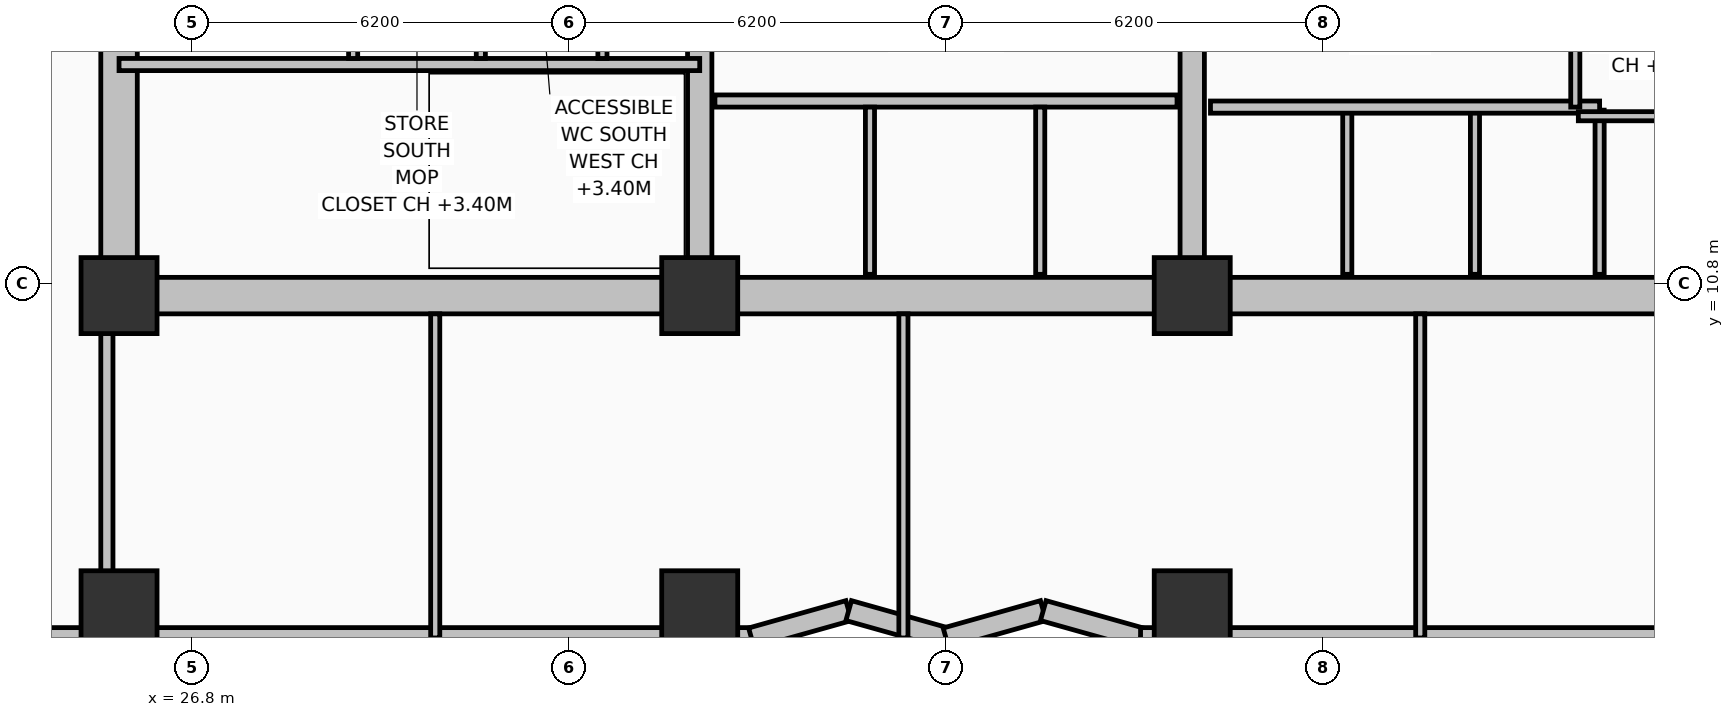
"""IFC4 building model, lengths in metres.
Left out: names, types, materials, properties, quantities, classifications, styles, units other than length and angle.
Written with IfcOpenShell. Run it as: python <this file> out.ifc"""

import sys

from ifc_helpers import new_model, si_unit, direction, frame, frame_2d, origin, origin_2d, place, context, subcontext, project, spatial, rectangle, extrude, element, fill, save


model = new_model("IFC4")
c1 = context("Model", 3, precision=1e-05, world=origin(), true_north=direction((0.0, 1.0)))
c2 = subcontext(c1, "Body", "Model", "MODEL_VIEW")
j1 = project(units=[si_unit("LENGTHUNIT", "METRE"), si_unit("PLANEANGLEUNIT", "RADIAN")], contexts=[c1])
p1 = place(None, origin())
s1 = spatial("IfcSite", under=j1, at=p1, CompositionType="ELEMENT")
p2 = place(p1, origin())
s2 = spatial("IfcBuilding", under=s1, at=p2, CompositionType="ELEMENT")
p3 = place(p2, frame((0.0, 0.0, 36.2)))
s3 = spatial("IfcBuildingStorey", under=s2, at=p3, CompositionType="ELEMENT", Elevation=36.2)
p4 = place(p3, frame((52.8, 10.6, 0.0), z_axis=(0.0, 0.0, 1.0), x_axis=(-1.0, 0.0, 0.0)))
e1 = element("IfcWall", 1, at=p4, inside=s3, PredefinedType="SHEAR", context=c2, shape_type="SweptSolid", body=[
    extrude(rectangle(XDim=27.2, YDim=0.6, at=frame_2d((13.6, 0.0))), origin(), (0.0, 0.0, 1.0), 3.7),
])
p5 = place(p3, frame((25.6, 10.9, 0.0), z_axis=(0.0, 0.0, 1.0), x_axis=(0.0, 1.0, 0.0)))
e2 = element("IfcWall", 2, at=p5, inside=s3, PredefinedType="SHEAR", context=c2, shape_type="SweptSolid", body=[
    extrude(rectangle(XDim=5.6, YDim=0.6, at=frame_2d((2.8, 0.0))), origin(), (0.0, 0.0, 1.0), 3.7),
])
for number, where, z_axis, x_axis in (
    (3, (35.15, 10.9, 0.0), (0.0, 0.0, 1.0), (0.0, 1.0, 0.0)),
    (4, (43.25, 10.9, 0.0), (0.0, 0.0, 1.0), (0.0, 1.0, 0.0)),
):
    element("IfcWall", number, at=place(p3, frame(where, z_axis=z_axis, x_axis=x_axis)), inside=s3, PredefinedType="SHEAR", context=c2, shape_type="SweptSolid", body=[
        extrude(rectangle(XDim=5.6, YDim=0.4, at=frame_2d((2.8, 0.0))), origin(), (0.0, 0.0, 1.0), 3.7),
    ])
for number, where, z_axis, x_axis in (
    (5, (25.6, 10.6, 0.0), (0.0, 0.0, 1.0), (1.0, 0.0, 0.0)),
    (6, (35.15, 10.6, 0.0), (0.0, 0.0, 1.0), (1.0, 0.0, 0.0)),
    (7, (43.25, 10.6, 0.0), (0.0, 0.0, 1.0), (1.0, 0.0, 0.0)),
    (8, (25.6, 5.45, 0.0), (0.0, 0.0, 1.0), (1.0, 0.0, 0.0)),
    (9, (35.15, 5.45, 0.0), (0.0, 0.0, 1.0), (1.0, 0.0, 0.0)),
    (10, (43.25, 5.45, 0.0), (0.0, 0.0, 1.0), (1.0, 0.0, 0.0)),
):
    element("IfcColumn", number, at=place(p3, frame(where, z_axis=z_axis, x_axis=x_axis)), inside=s3, PredefinedType="COLUMN", context=c2, shape_type="SweptSolid", body=[
        extrude(rectangle(XDim=1.25, YDim=1.25, at=origin_2d()), origin(), (0.0, 0.0, 1.0), 3.7),
    ])
p6 = place(p3, frame((18.6, 4.97, 0.0), z_axis=(0.0, 0.0, 1.0), x_axis=(1.0, 0.0, 0.0)))
e11 = element("IfcWall", 11, at=p6, inside=s3, PredefinedType="SOLIDWALL", context=c2, shape_type="SweptSolid", body=[
    extrude(rectangle(XDim=17.4, YDim=0.34, at=frame_2d((8.7, 0.0))), origin(), (0.0, 0.0, 1.0), 2.7),
])
p7 = place(p6, frame((1.442, 0.0, 0.93)))
e12 = element("IfcOpeningElement", 12, at=p7, cuts=e11, PredefinedType="OPENING", context=c2, shape_type="SweptSolid", body=[
    extrude(rectangle(XDim=1.1, YDim=1.65, at=frame_2d((0.55, 0.825))), frame((0.0, 0.18, 0.0), z_axis=(0.0, -1.0, 0.0), x_axis=(1.0, 0.0, 0.0)), (0.0, 0.0, 1.0), 0.36),
])
p8 = place(p6, frame((3.075, 0.0, 0.93)))
e13 = element("IfcOpeningElement", 13, at=p8, cuts=e11, PredefinedType="OPENING", context=c2, shape_type="SweptSolid", body=[
    extrude(rectangle(XDim=1.1, YDim=1.65, at=frame_2d((0.55, 0.825))), frame((0.0, 0.18, 0.0), z_axis=(0.0, -1.0, 0.0), x_axis=(1.0, 0.0, 0.0)), (0.0, 0.0, 1.0), 0.36),
])
p9 = place(p6, frame((9.492, 0.0, 0.93)))
e14 = element("IfcOpeningElement", 14, at=p9, cuts=e11, PredefinedType="OPENING", context=c2, shape_type="SweptSolid", body=[
    extrude(rectangle(XDim=1.1, YDim=1.65, at=frame_2d((0.55, 0.825))), frame((0.0, 0.18, 0.0), z_axis=(0.0, -1.0, 0.0), x_axis=(1.0, 0.0, 0.0)), (0.0, 0.0, 1.0), 0.36),
])
p10 = place(p6, frame((12.875, 0.0, 0.93)))
e15 = element("IfcOpeningElement", 15, at=p10, cuts=e11, PredefinedType="OPENING", context=c2, shape_type="SweptSolid", body=[
    extrude(rectangle(XDim=1.1, YDim=1.65, at=frame_2d((0.55, 0.825))), frame((0.0, 0.18, 0.0), z_axis=(0.0, -1.0, 0.0), x_axis=(1.0, 0.0, 0.0)), (0.0, 0.0, 1.0), 0.36),
])
p11 = place(p3, frame((36.0, 4.97, 0.0), z_axis=(0.0, 0.0, 1.0), x_axis=(0.962662902433, 0.270703040766, 0.0)))
e16 = element("IfcWall", 16, at=p11, inside=s3, PredefinedType="SOLIDWALL", context=c2, shape_type="SweptSolid", body=[
    extrude(rectangle(XDim=1.662, YDim=0.34, at=frame_2d((0.831, 0.0))), origin(), (0.0, 0.0, 1.0), 2.7),
])
p12 = place(p3, frame((37.6, 5.42, 0.0), z_axis=(0.0, 0.0, 1.0), x_axis=(0.962652136636, -0.270741322725, 0.0)))
e17 = element("IfcWall", 17, at=p12, inside=s3, PredefinedType="SOLIDWALL", context=c2, shape_type="SweptSolid", body=[
    extrude(rectangle(XDim=1.662, YDim=0.34, at=frame_2d((0.831, 0.0))), origin(), (0.0, 0.0, 1.0), 2.7),
])
p13 = place(p3, frame((39.2, 4.97, 0.0), z_axis=(0.0, 0.0, 1.0), x_axis=(0.962662902433, 0.270703040766, 0.0)))
e18 = element("IfcWall", 18, at=p13, inside=s3, PredefinedType="SOLIDWALL", context=c2, shape_type="SweptSolid", body=[
    extrude(rectangle(XDim=1.662, YDim=0.34, at=frame_2d((0.831, 0.0))), origin(), (0.0, 0.0, 1.0), 2.7),
])
p14 = place(p3, frame((40.8, 5.42, 0.0), z_axis=(0.0, 0.0, 1.0), x_axis=(0.962652136636, -0.270741322725, 0.0)))
e19 = element("IfcWall", 19, at=p14, inside=s3, PredefinedType="SOLIDWALL", context=c2, shape_type="SweptSolid", body=[
    extrude(rectangle(XDim=1.662, YDim=0.34, at=frame_2d((0.831, 0.0))), origin(), (0.0, 0.0, 1.0), 2.7),
])
p15 = place(p3, frame((42.4, 4.97, 0.0), z_axis=(0.0, 0.0, 1.0), x_axis=(1.0, 0.0, 0.0)))
e20 = element("IfcWall", 20, at=p15, inside=s3, PredefinedType="SOLIDWALL", context=c2, shape_type="SweptSolid", body=[
    extrude(rectangle(XDim=17.4, YDim=0.34, at=frame_2d((8.7, 0.0))), origin(), (0.0, 0.0, 1.0), 2.7),
])
p16 = place(p15, frame((2.06, 0.0, 0.93)))
e21 = element("IfcOpeningElement", 21, at=p16, cuts=e20, PredefinedType="OPENING", context=c2, shape_type="SweptSolid", body=[
    extrude(rectangle(XDim=1.1, YDim=1.65, at=frame_2d((0.55, 0.825))), frame((0.0, 0.18, 0.0), z_axis=(0.0, -1.0, 0.0), x_axis=(1.0, 0.0, 0.0)), (0.0, 0.0, 1.0), 0.36),
])
p17 = place(p15, frame((5.28, 0.0, 0.93)))
e22 = element("IfcOpeningElement", 22, at=p17, cuts=e20, PredefinedType="OPENING", context=c2, shape_type="SweptSolid", body=[
    extrude(rectangle(XDim=1.1, YDim=1.65, at=frame_2d((0.55, 0.825))), frame((0.0, 0.18, 0.0), z_axis=(0.0, -1.0, 0.0), x_axis=(1.0, 0.0, 0.0)), (0.0, 0.0, 1.0), 0.36),
])
p18 = place(p15, frame((7.8, 0.0, 0.93)))
e23 = element("IfcOpeningElement", 23, at=p18, cuts=e20, PredefinedType="OPENING", context=c2, shape_type="SweptSolid", body=[
    extrude(rectangle(XDim=1.1, YDim=1.65, at=frame_2d((0.55, 0.825))), frame((0.0, 0.18, 0.0), z_axis=(0.0, -1.0, 0.0), x_axis=(1.0, 0.0, 0.0)), (0.0, 0.0, 1.0), 0.36),
])
p19 = place(p15, frame((14.59, 0.0, 0.93)))
e24 = element("IfcOpeningElement", 24, at=p19, cuts=e20, PredefinedType="OPENING", context=c2, shape_type="SweptSolid", body=[
    extrude(rectangle(XDim=1.1, YDim=1.65, at=frame_2d((0.55, 0.825))), frame((0.0, 0.18, 0.0), z_axis=(0.0, -1.0, 0.0), x_axis=(1.0, 0.0, 0.0)), (0.0, 0.0, 1.0), 0.36),
])
p20 = place(p3, frame((25.6, 14.4, 0.0), z_axis=(0.0, 0.0, 1.0), x_axis=(1.0, 0.0, 0.0)))
e25 = element("IfcWall", 25, at=p20, inside=s3, PredefinedType="SHEAR", context=c2, shape_type="SweptSolid", body=[
    extrude(rectangle(XDim=9.55, YDim=0.2, at=frame_2d((4.775, 0.0))), origin(), (0.0, 0.0, 1.0), 3.7),
])
p21 = place(p20, frame((1.05, 0.0, 0.0)))
e26 = element("IfcOpeningElement", 26, at=p21, cuts=e25, PredefinedType="OPENING", context=c2, shape_type="SweptSolid", body=[
    extrude(rectangle(XDim=1.1, YDim=2.15, at=frame_2d((0.55, 1.075))), frame((0.0, 0.11, 0.0), z_axis=(0.0, -1.0, 0.0), x_axis=(1.0, 0.0, 0.0)), (0.0, 0.0, 1.0), 0.22),
])
for number, where, z_axis, x_axis in (
    (27, (29.45, 14.5, 0.0), (0.0, 0.0, 1.0), (0.0, 1.0, 0.0)),
    (28, (31.55, 14.5, 0.0), (0.0, 0.0, 1.0), (0.0, 1.0, 0.0)),
):
    element("IfcWall", number, at=place(p3, frame(where, z_axis=z_axis, x_axis=x_axis)), inside=s3, PredefinedType="PARTITIONING", context=c2, shape_type="SweptSolid", body=[
        extrude(rectangle(XDim=2.08, YDim=0.15, at=frame_2d((1.04, 0.0))), origin(), (0.0, 0.0, 1.0), 2.53),
    ])
p22 = place(p3, frame((33.55, 14.5, 0.0), z_axis=(0.0, 0.0, 1.0), x_axis=(0.0, 1.0, 0.0)))
e29 = element("IfcWall", 29, at=p22, inside=s3, PredefinedType="PARTITIONING", context=c2, shape_type="SweptSolid", body=[
    extrude(rectangle(XDim=2.08, YDim=0.15, at=frame_2d((1.04, 0.0))), origin(), (0.0, 0.0, 1.0), 2.53),
])
p23 = place(p22, frame((0.55, 0.0, 0.0)))
e30 = element("IfcOpeningElement", 30, at=p23, cuts=e29, PredefinedType="OPENING", context=c2, shape_type="SweptSolid", body=[
    extrude(rectangle(XDim=0.85, YDim=2.05, at=frame_2d((0.425, 1.025))), frame((0.0, 0.085, 0.0), z_axis=(0.0, -1.0, 0.0), x_axis=(1.0, 0.0, 0.0)), (0.0, 0.0, 1.0), 0.17),
])
p24 = place(p3, frame((35.4, 13.8, 0.0), z_axis=(0.0, 0.0, 1.0), x_axis=(1.0, 0.0, 0.0)))
e31 = element("IfcWall", 31, at=p24, inside=s3, PredefinedType="PARTITIONING", context=c2, shape_type="SweptSolid", body=[
    extrude(rectangle(XDim=7.6, YDim=0.2, at=frame_2d((3.8, 0.0))), origin(), (0.0, 0.0, 1.0), 2.3),
])
p25 = place(p24, frame((0.7, 0.0, 0.0)))
e32 = element("IfcOpeningElement", 32, at=p25, cuts=e31, PredefinedType="OPENING", context=c2, shape_type="SweptSolid", body=[
    extrude(rectangle(XDim=1.1, YDim=2.15, at=frame_2d((0.55, 1.075))), frame((0.0, 0.11, 0.0), z_axis=(0.0, -1.0, 0.0), x_axis=(1.0, 0.0, 0.0)), (0.0, 0.0, 1.0), 0.22),
])
p26 = place(p24, frame((3.35, 0.0, 0.0)))
e33 = element("IfcOpeningElement", 33, at=p26, cuts=e31, PredefinedType="OPENING", context=c2, shape_type="SweptSolid", body=[
    extrude(rectangle(XDim=1.2, YDim=2.15, at=frame_2d((0.6, 1.075))), frame((0.0, 0.11, 0.0), z_axis=(0.0, -1.0, 0.0), x_axis=(1.0, 0.0, 0.0)), (0.0, 0.0, 1.0), 0.22),
])
for number, where, z_axis, x_axis in (
    (34, (37.95, 10.95, 0.0), (0.0, 0.0, 1.0), (0.0, 1.0, 0.0)),
    (35, (40.75, 10.95, 0.0), (0.0, 0.0, 1.0), (0.0, 1.0, 0.0)),
):
    element("IfcWall", number, at=place(p3, frame(where, z_axis=z_axis, x_axis=x_axis)), inside=s3, PredefinedType="PARTITIONING", context=c2, shape_type="SweptSolid", body=[
        extrude(rectangle(XDim=2.75, YDim=0.15, at=frame_2d((1.375, 0.0))), origin(), (0.0, 0.0, 1.0), 2.53),
    ])
for number, where, z_axis, x_axis in (
    (36, (45.8, 10.95, 0.0), (0.0, 0.0, 1.0), (0.0, 1.0, 0.0)),
    (37, (47.9, 10.95, 0.0), (0.0, 0.0, 1.0), (0.0, 1.0, 0.0)),
    (38, (49.95, 10.95, 0.0), (0.0, 0.0, 1.0), (0.0, 1.0, 0.0)),
):
    element("IfcWall", number, at=place(p3, frame(where, z_axis=z_axis, x_axis=x_axis)), inside=s3, PredefinedType="PARTITIONING", context=c2, shape_type="SweptSolid", body=[
        extrude(rectangle(XDim=2.7, YDim=0.15, at=frame_2d((1.35, 0.0))), origin(), (0.0, 0.0, 1.0), 2.53),
    ])
p27 = place(p3, frame((43.55, 13.7, 0.0), z_axis=(0.0, 0.0, 1.0), x_axis=(1.0, 0.0, 0.0)))
e39 = element("IfcWall", 39, at=p27, inside=s3, PredefinedType="PARTITIONING", context=c2, shape_type="SweptSolid", body=[
    extrude(rectangle(XDim=6.4, YDim=0.2, at=frame_2d((3.2, 0.0))), origin(), (0.0, 0.0, 1.0), 2.53),
])
p28 = place(p27, frame((0.7, 0.0, 0.0)))
e40 = element("IfcOpeningElement", 40, at=p28, cuts=e39, PredefinedType="OPENING", context=c2, shape_type="SweptSolid", body=[
    extrude(rectangle(XDim=1.0, YDim=2.15, at=frame_2d((0.5, 1.075))), frame((0.0, 0.11, 0.0), z_axis=(0.0, -1.0, 0.0), x_axis=(1.0, 0.0, 0.0)), (0.0, 0.0, 1.0), 0.22),
])
p29 = place(p27, frame((2.8, 0.0, 0.0)))
e41 = element("IfcOpeningElement", 41, at=p29, cuts=e39, PredefinedType="OPENING", context=c2, shape_type="SweptSolid", body=[
    extrude(rectangle(XDim=1.0, YDim=2.15, at=frame_2d((0.5, 1.075))), frame((0.0, 0.11, 0.0), z_axis=(0.0, -1.0, 0.0), x_axis=(1.0, 0.0, 0.0)), (0.0, 0.0, 1.0), 0.22),
])
p30 = place(p27, frame((4.9, 0.0, 0.0)))
e42 = element("IfcOpeningElement", 42, at=p30, cuts=e39, PredefinedType="OPENING", context=c2, shape_type="SweptSolid", body=[
    extrude(rectangle(XDim=1.0, YDim=2.15, at=frame_2d((0.5, 1.075))), frame((0.0, 0.11, 0.0), z_axis=(0.0, -1.0, 0.0), x_axis=(1.0, 0.0, 0.0)), (0.0, 0.0, 1.0), 0.22),
])
p31 = place(p3, frame((49.55, 13.7, 0.0), z_axis=(0.0, 0.0, 1.0), x_axis=(0.0, 1.0, 0.0)))
e43 = element("IfcWall", 43, at=p31, inside=s3, PredefinedType="PARTITIONING", context=c2, shape_type="SweptSolid", body=[
    extrude(rectangle(XDim=2.88, YDim=0.15, at=frame_2d((1.44, 0.0))), origin(), (0.0, 0.0, 1.0), 2.53),
])
p32 = place(p3, frame((49.6, 13.55, 0.0), z_axis=(0.0, 0.0, 1.0), x_axis=(1.0, 0.0, 0.0)))
e44 = element("IfcWall", 44, at=p32, inside=s3, PredefinedType="PARTITIONING", context=c2, shape_type="SweptSolid", body=[
    extrude(rectangle(XDim=2.85, YDim=0.15, at=frame_2d((1.425, 0.0))), origin(), (0.0, 0.0, 1.0), 2.53),
])
p33 = place(p32, frame((0.9, 0.0, 0.0)))
e45 = element("IfcOpeningElement", 45, at=p33, cuts=e44, PredefinedType="OPENING", context=c2, shape_type="SweptSolid", body=[
    extrude(rectangle(XDim=0.85, YDim=2.1, at=frame_2d((0.425, 1.05))), frame((0.0, 0.085, 0.0), z_axis=(0.0, -1.0, 0.0), x_axis=(1.0, 0.0, 0.0)), (0.0, 0.0, 1.0), 0.17),
])
p34 = place(p3, frame((30.8, 4.97, 0.0), z_axis=(0.0, 0.0, 1.0), x_axis=(0.0, 1.0, 0.0)))
e46 = element("IfcWall", 46, at=p34, inside=s3, PredefinedType="PARTITIONING", context=c2, shape_type="SweptSolid", body=[
    extrude(rectangle(XDim=5.33, YDim=0.15, at=frame_2d((2.665, 0.0))), origin(), (0.0, 0.0, 1.0), 2.53),
])
p35 = place(p34, frame((1.6, 0.0, 0.0)))
e47 = element("IfcOpeningElement", 47, at=p35, cuts=e46, PredefinedType="OPENING", context=c2, shape_type="SweptSolid", body=[
    extrude(rectangle(XDim=0.9, YDim=2.1, at=frame_2d((0.45, 1.05))), frame((0.0, 0.085, 0.0), z_axis=(0.0, -1.0, 0.0), x_axis=(1.0, 0.0, 0.0)), (0.0, 0.0, 1.0), 0.17),
])
p36 = place(p3, frame((38.5, 4.97, 0.0), z_axis=(0.0, 0.0, 1.0), x_axis=(0.0, 1.0, 0.0)))
e48 = element("IfcWall", 48, at=p36, inside=s3, PredefinedType="PARTITIONING", context=c2, shape_type="SweptSolid", body=[
    extrude(rectangle(XDim=5.33, YDim=0.15, at=frame_2d((2.665, 0.0))), origin(), (0.0, 0.0, 1.0), 2.53),
])
p37 = place(p3, frame((47.0, 4.97, 0.0), z_axis=(0.0, 0.0, 1.0), x_axis=(0.0, 1.0, 0.0)))
e49 = element("IfcWall", 49, at=p37, inside=s3, PredefinedType="PARTITIONING", context=c2, shape_type="SweptSolid", body=[
    extrude(rectangle(XDim=5.33, YDim=0.15, at=frame_2d((2.665, 0.0))), origin(), (0.0, 0.0, 1.0), 2.53),
])
p38 = place(p37, frame((1.6, 0.0, 0.0)))
e50 = element("IfcOpeningElement", 50, at=p38, cuts=e49, PredefinedType="OPENING", context=c2, shape_type="SweptSolid", body=[
    extrude(rectangle(XDim=0.9, YDim=2.1, at=frame_2d((0.45, 1.05))), frame((0.0, 0.085, 0.0), z_axis=(0.0, -1.0, 0.0), x_axis=(1.0, 0.0, 0.0)), (0.0, 0.0, 1.0), 0.17),
])
p39 = place(p3, frame((25.4, 5.92, 0.0), z_axis=(0.0, 0.0, 1.0), x_axis=(0.0, 1.0, 0.0)))
e51 = element("IfcWall", 51, at=p39, inside=s3, PredefinedType="PARTITIONING", context=c2, shape_type="SweptSolid", body=[
    extrude(rectangle(XDim=4.38, YDim=0.2, at=frame_2d((2.19, 0.0))), origin(), (0.0, 0.0, 1.0), 2.53),
])
p40 = place(p39, frame((0.85, 0.0, 0.0)))
e52 = element("IfcOpeningElement", 52, at=p40, cuts=e51, PredefinedType="OPENING", context=c2, shape_type="SweptSolid", body=[
    extrude(rectangle(XDim=0.9, YDim=2.1, at=frame_2d((0.45, 1.05))), frame((0.0, 0.11, 0.0), z_axis=(0.0, -1.0, 0.0), x_axis=(1.0, 0.0, 0.0)), (0.0, 0.0, 1.0), 0.22),
])
p41 = place(p9, origin())
e53 = element("IfcWindow", 53, at=p41, inside=s3, PartitioningType="SINGLE_PANEL", PredefinedType="WINDOW", context=c2, shape_type="SweptSolid", body=[
    extrude(rectangle(XDim=1.1, YDim=1.65, at=frame_2d((0.55, 0.825))), frame((0.0, 0.03, 0.0), z_axis=(0.0, -1.0, 0.0), x_axis=(1.0, 0.0, 0.0)), (0.0, 0.0, 1.0), 0.06),
])
fill(e14, e53)
p42 = place(p10, origin())
e54 = element("IfcWindow", 54, at=p42, inside=s3, PartitioningType="SINGLE_PANEL", PredefinedType="WINDOW", context=c2, shape_type="SweptSolid", body=[
    extrude(rectangle(XDim=1.1, YDim=1.65, at=frame_2d((0.55, 0.825))), frame((0.0, 0.03, 0.0), z_axis=(0.0, -1.0, 0.0), x_axis=(1.0, 0.0, 0.0)), (0.0, 0.0, 1.0), 0.06),
])
fill(e15, e54)
p43 = place(p16, origin())
e55 = element("IfcWindow", 55, at=p43, inside=s3, PartitioningType="SINGLE_PANEL", PredefinedType="WINDOW", context=c2, shape_type="SweptSolid", body=[
    extrude(rectangle(XDim=1.1, YDim=1.65, at=frame_2d((0.55, 0.825))), frame((0.0, 0.03, 0.0), z_axis=(0.0, -1.0, 0.0), x_axis=(1.0, 0.0, 0.0)), (0.0, 0.0, 1.0), 0.06),
])
fill(e21, e55)
p44 = place(p17, origin())
e56 = element("IfcWindow", 56, at=p44, inside=s3, PartitioningType="SINGLE_PANEL", PredefinedType="WINDOW", context=c2, shape_type="SweptSolid", body=[
    extrude(rectangle(XDim=1.1, YDim=1.65, at=frame_2d((0.55, 0.825))), frame((0.0, 0.03, 0.0), z_axis=(0.0, -1.0, 0.0), x_axis=(1.0, 0.0, 0.0)), (0.0, 0.0, 1.0), 0.06),
])
fill(e22, e56)
p45 = place(p18, origin())
e57 = element("IfcWindow", 57, at=p45, inside=s3, PartitioningType="SINGLE_PANEL", PredefinedType="WINDOW", context=c2, shape_type="SweptSolid", body=[
    extrude(rectangle(XDim=1.1, YDim=1.65, at=frame_2d((0.55, 0.825))), frame((0.0, 0.03, 0.0), z_axis=(0.0, -1.0, 0.0), x_axis=(1.0, 0.0, 0.0)), (0.0, 0.0, 1.0), 0.06),
])
fill(e23, e57)
p46 = place(p21, origin())
e58 = element("IfcDoor", 58, at=p46, inside=s3, OperationType="SINGLE_SWING_LEFT", PredefinedType="DOOR", context=c2, shape_type="SweptSolid", body=[
    extrude(rectangle(XDim=1.1, YDim=2.15, at=frame_2d((0.55, 1.075))), frame((0.0, 0.025, 0.0), z_axis=(0.0, -1.0, 0.0), x_axis=(1.0, 0.0, 0.0)), (0.0, 0.0, 1.0), 0.05),
])
fill(e26, e58)
p47 = place(p25, origin())
e59 = element("IfcDoor", 59, at=p47, inside=s3, OperationType="SLIDING_TO_LEFT", PredefinedType="DOOR", context=c2, shape_type="SweptSolid", body=[
    extrude(rectangle(XDim=1.1, YDim=2.15, at=frame_2d((0.55, 1.075))), frame((0.0, 0.025, 0.0), z_axis=(0.0, -1.0, 0.0), x_axis=(1.0, 0.0, 0.0)), (0.0, 0.0, 1.0), 0.05),
])
fill(e32, e59)
p48 = place(p26, origin())
e60 = element("IfcDoor", 60, at=p48, inside=s3, OperationType="SLIDING_TO_LEFT", PredefinedType="DOOR", context=c2, shape_type="SweptSolid", body=[
    extrude(rectangle(XDim=1.2, YDim=2.15, at=frame_2d((0.6, 1.075))), frame((0.0, 0.025, 0.0), z_axis=(0.0, -1.0, 0.0), x_axis=(1.0, 0.0, 0.0)), (0.0, 0.0, 1.0), 0.05),
])
fill(e33, e60)
p49 = place(p28, origin())
e61 = element("IfcDoor", 61, at=p49, inside=s3, OperationType="SLIDING_TO_LEFT", PredefinedType="DOOR", context=c2, shape_type="SweptSolid", body=[
    extrude(rectangle(XDim=1.0, YDim=2.15, at=frame_2d((0.5, 1.075))), frame((0.0, 0.025, 0.0), z_axis=(0.0, -1.0, 0.0), x_axis=(1.0, 0.0, 0.0)), (0.0, 0.0, 1.0), 0.05),
])
fill(e40, e61)
p50 = place(p29, origin())
e62 = element("IfcDoor", 62, at=p50, inside=s3, OperationType="SLIDING_TO_LEFT", PredefinedType="DOOR", context=c2, shape_type="SweptSolid", body=[
    extrude(rectangle(XDim=1.0, YDim=2.15, at=frame_2d((0.5, 1.075))), frame((0.0, 0.025, 0.0), z_axis=(0.0, -1.0, 0.0), x_axis=(1.0, 0.0, 0.0)), (0.0, 0.0, 1.0), 0.05),
])
fill(e41, e62)
p51 = place(p30, origin())
e63 = element("IfcDoor", 63, at=p51, inside=s3, OperationType="SLIDING_TO_LEFT", PredefinedType="DOOR", context=c2, shape_type="SweptSolid", body=[
    extrude(rectangle(XDim=1.0, YDim=2.15, at=frame_2d((0.5, 1.075))), frame((0.0, 0.025, 0.0), z_axis=(0.0, -1.0, 0.0), x_axis=(1.0, 0.0, 0.0)), (0.0, 0.0, 1.0), 0.05),
])
fill(e42, e63)
p52 = place(p33, origin())
e64 = element("IfcDoor", 64, at=p52, inside=s3, OperationType="SINGLE_SWING_LEFT", PredefinedType="DOOR", context=c2, shape_type="SweptSolid", body=[
    extrude(rectangle(XDim=0.85, YDim=2.1, at=frame_2d((0.425, 1.05))), frame((0.0, 0.025, 0.0), z_axis=(0.0, -1.0, 0.0), x_axis=(1.0, 0.0, 0.0)), (0.0, 0.0, 1.0), 0.05),
])
fill(e45, e64)
p53 = place(p35, origin())
e65 = element("IfcDoor", 65, at=p53, inside=s3, OperationType="SINGLE_SWING_LEFT", PredefinedType="DOOR", context=c2, shape_type="SweptSolid", body=[
    extrude(rectangle(XDim=0.9, YDim=2.1, at=frame_2d((0.45, 1.05))), frame((0.0, 0.025, 0.0), z_axis=(0.0, -1.0, 0.0), x_axis=(1.0, 0.0, 0.0)), (0.0, 0.0, 1.0), 0.05),
])
fill(e47, e65)
p54 = place(p38, origin())
e66 = element("IfcDoor", 66, at=p54, inside=s3, OperationType="SINGLE_SWING_LEFT", PredefinedType="DOOR", context=c2, shape_type="SweptSolid", body=[
    extrude(rectangle(XDim=0.9, YDim=2.1, at=frame_2d((0.45, 1.05))), frame((0.0, 0.025, 0.0), z_axis=(0.0, -1.0, 0.0), x_axis=(1.0, 0.0, 0.0)), (0.0, 0.0, 1.0), 0.05),
])
fill(e50, e66)
p55 = place(p40, origin())
e67 = element("IfcDoor", 67, at=p55, inside=s3, OperationType="SINGLE_SWING_LEFT", PredefinedType="DOOR", context=c2, shape_type="SweptSolid", body=[
    extrude(rectangle(XDim=0.9, YDim=2.1, at=frame_2d((0.45, 1.05))), frame((0.0, 0.025, 0.0), z_axis=(0.0, -1.0, 0.0), x_axis=(1.0, 0.0, 0.0)), (0.0, 0.0, 1.0), 0.05),
])
fill(e52, e67)
save(model, sys.argv[1])
